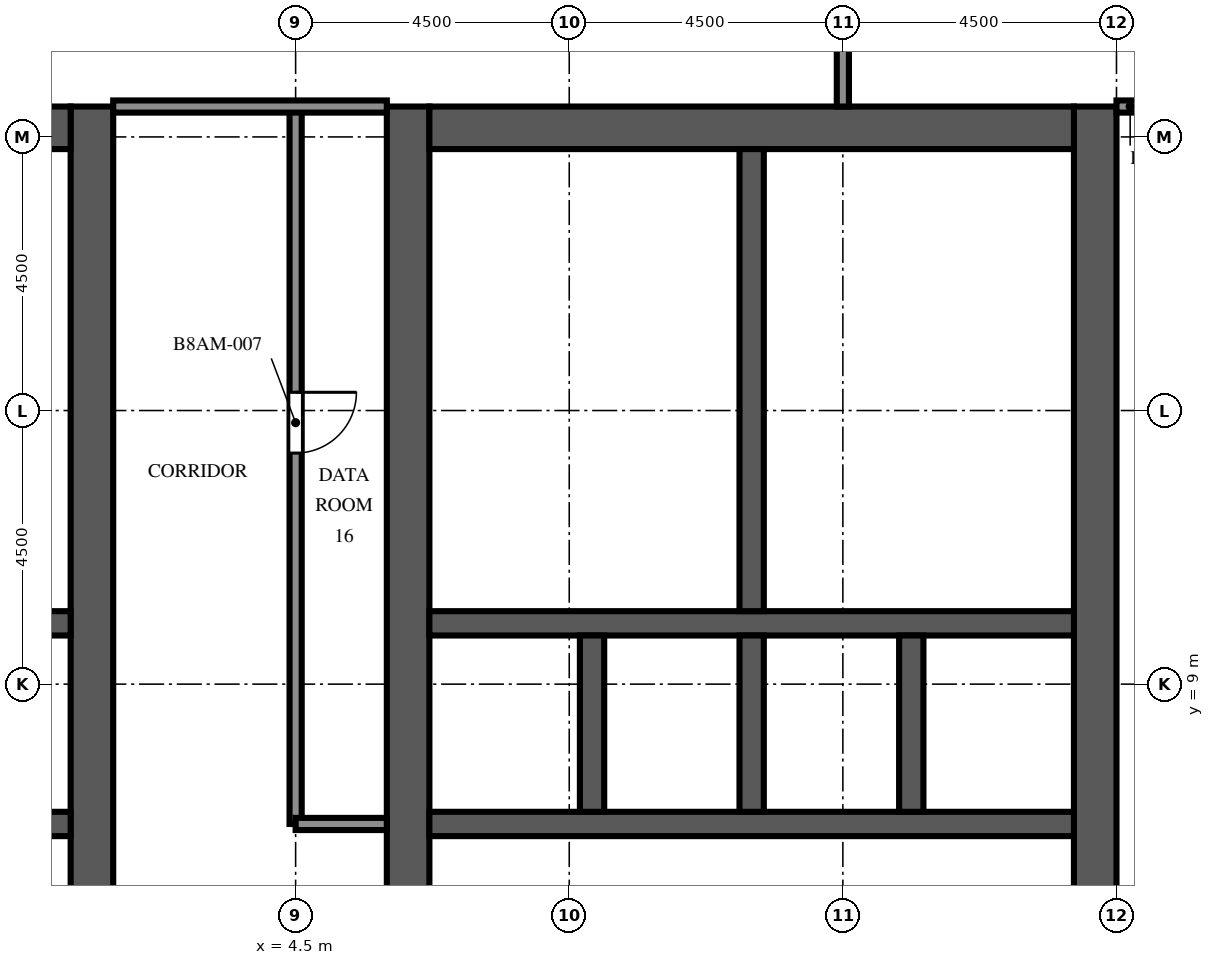
"""IFC4 building model, lengths in metres.
Left out: names, types, materials, properties, quantities, classifications, styles, units other than length and angle.
Written with IfcOpenShell. Run it as: python <this file> out.ifc"""

import sys

from ifc_helpers import new_model, si_unit, direction, frame, frame_2d, origin, place, context, subcontext, project, spatial, rectangle, extrude, element, fill, save


model = new_model("IFC4")
c1 = context("Model", 3, precision=1e-05, world=origin(), true_north=direction((0.0, 1.0)))
c2 = subcontext(c1, "Body", "Model", "MODEL_VIEW")
j1 = project(units=[si_unit("LENGTHUNIT", "METRE"), si_unit("PLANEANGLEUNIT", "RADIAN")], contexts=[c1])
p1 = place(None, origin())
s1 = spatial("IfcSite", under=j1, at=p1, CompositionType="ELEMENT")
p2 = place(p1, origin())
s2 = spatial("IfcBuilding", under=s1, at=p2, CompositionType="ELEMENT")
p3 = place(p2, frame((0.0, 0.0, 295.0)))
s3 = spatial("IfcBuildingStorey", under=s2, at=p3, CompositionType="ELEMENT", Elevation=295.0)
p4 = place(p3, frame((1.15, -9.0, 0.0), z_axis=(0.0, 0.0, 1.0), x_axis=(0.0, 1.0, 0.0)))
e1 = element("IfcWall", 1, at=p4, inside=s3, PredefinedType="SHEAR", context=c2, shape_type="SweptSolid", body=[
    extrude(rectangle(XDim=27.5, YDim=0.7, at=frame_2d((13.75, 0.0))), origin(), (0.0, 0.0, 1.0), 6.0),
])
p5 = place(p4, frame((12.55, 0.0, 0.0)))
e2 = element("IfcOpeningElement", 2, at=p5, cuts=e1, PredefinedType="OPENING", context=c2, shape_type="SweptSolid", body=[
    extrude(rectangle(XDim=2.4, YDim=2.4, at=frame_2d((1.2, 1.2))), frame((0.0, 0.36, 0.0), z_axis=(0.0, -1.0, 0.0), x_axis=(1.0, 0.0, 0.0)), (0.0, 0.0, 1.0), 0.72),
])
p6 = place(p4, frame((5.46, 0.0, 0.0)))
e3 = element("IfcOpeningElement", 3, at=p6, cuts=e1, PredefinedType="OPENING", context=c2, shape_type="SweptSolid", body=[
    extrude(rectangle(XDim=0.968, YDim=2.1, at=frame_2d((0.484, 1.05))), frame((0.0, 0.36, 0.0), z_axis=(0.0, -1.0, 0.0), x_axis=(1.0, 0.0, 0.0)), (0.0, 0.0, 1.0), 0.72),
])
p7 = place(p4, frame((23.54, 0.0, 0.0)))
e4 = element("IfcOpeningElement", 4, at=p7, cuts=e1, PredefinedType="OPENING", context=c2, shape_type="SweptSolid", body=[
    extrude(rectangle(XDim=1.2, YDim=2.1, at=frame_2d((0.6, 1.05))), frame((0.0, 0.36, 0.0), z_axis=(0.0, -1.0, 0.0), x_axis=(1.0, 0.0, 0.0)), (0.0, 0.0, 1.0), 0.72),
])
p8 = place(p3, frame((-9.8, 18.15, 0.0), z_axis=(0.0, 0.0, 1.0), x_axis=(1.0, 0.0, 0.0)))
e5 = element("IfcWall", 5, at=p8, inside=s3, PredefinedType="SHEAR", context=c2, shape_type="SweptSolid", body=[
    extrude(rectangle(XDim=10.6, YDim=0.7, at=frame_2d((5.3, 0.0))), origin(), (0.0, 0.0, 1.0), 6.0),
])
p9 = place(p3, frame((-9.8, 6.7, 0.0), z_axis=(0.0, 0.0, 1.0), x_axis=(1.0, 0.0, 0.0)))
e6 = element("IfcWall", 6, at=p9, inside=s3, PredefinedType="SHEAR", context=c2, shape_type="SweptSolid", body=[
    extrude(rectangle(XDim=10.6, YDim=0.4, at=frame_2d((5.3, 0.0))), origin(), (0.0, 0.0, 1.0), 6.0),
])
p10 = place(p9, frame((3.438, 0.0, 0.0)))
e7 = element("IfcOpeningElement", 7, at=p10, cuts=e6, PredefinedType="OPENING", context=c2, shape_type="SweptSolid", body=[
    extrude(rectangle(XDim=1.1, YDim=2.1, at=frame_2d((0.55, 1.05))), frame((0.0, 0.21, 0.0), z_axis=(0.0, -1.0, 0.0), x_axis=(1.0, 0.0, 0.0)), (0.0, 0.0, 1.0), 0.42),
])
p11 = place(p9, frame((6.062, 0.0, 0.0)))
e8 = element("IfcOpeningElement", 8, at=p11, cuts=e6, PredefinedType="OPENING", context=c2, shape_type="SweptSolid", body=[
    extrude(rectangle(XDim=1.1, YDim=2.1, at=frame_2d((0.55, 1.05))), frame((0.0, 0.21, 0.0), z_axis=(0.0, -1.0, 0.0), x_axis=(1.0, 0.0, 0.0)), (0.0, 0.0, 1.0), 0.42),
])
p12 = place(p9, frame((8.812, 0.0, 0.0)))
e9 = element("IfcOpeningElement", 9, at=p12, cuts=e6, PredefinedType="OPENING", context=c2, shape_type="SweptSolid", body=[
    extrude(rectangle(XDim=1.1, YDim=2.1, at=frame_2d((0.55, 1.05))), frame((0.0, 0.21, 0.0), z_axis=(0.0, -1.0, 0.0), x_axis=(1.0, 0.0, 0.0)), (0.0, 0.0, 1.0), 0.42),
])
p13 = place(p9, frame((0.738, 0.0, 0.0)))
e10 = element("IfcOpeningElement", 10, at=p13, cuts=e6, PredefinedType="OPENING", context=c2, shape_type="SweptSolid", body=[
    extrude(rectangle(XDim=1.0, YDim=2.1, at=frame_2d((0.5, 1.05))), frame((0.0, 0.21, 0.0), z_axis=(0.0, -1.0, 0.0), x_axis=(1.0, 0.0, 0.0)), (0.0, 0.0, 1.0), 0.42),
])
p14 = place(p3, frame((-9.8, 10.0, 0.0), z_axis=(0.0, 0.0, 1.0), x_axis=(1.0, 0.0, 0.0)))
e11 = element("IfcWall", 11, at=p14, inside=s3, PredefinedType="SHEAR", context=c2, shape_type="SweptSolid", body=[
    extrude(rectangle(XDim=10.6, YDim=0.4, at=frame_2d((5.3, 0.0))), origin(), (0.0, 0.0, 1.0), 6.0),
])
p15 = place(p3, frame((6.35, -9.0, 0.0), z_axis=(0.0, 0.0, 1.0), x_axis=(0.0, 1.0, 0.0)))
e12 = element("IfcWall", 12, at=p15, inside=s3, PredefinedType="SHEAR", context=c2, shape_type="SweptSolid", body=[
    extrude(rectangle(XDim=27.5, YDim=0.7, at=frame_2d((13.75, 0.0))), origin(), (0.0, 0.0, 1.0), 6.0),
])
p16 = place(p15, frame((12.55, 0.0, 0.0)))
e13 = element("IfcOpeningElement", 13, at=p16, cuts=e12, PredefinedType="OPENING", context=c2, shape_type="SweptSolid", body=[
    extrude(rectangle(XDim=2.4, YDim=2.4, at=frame_2d((1.2, 1.2))), frame((0.0, 0.36, 0.0), z_axis=(0.0, -1.0, 0.0), x_axis=(1.0, 0.0, 0.0)), (0.0, 0.0, 1.0), 0.72),
])
p17 = place(p15, frame((5.46, 0.0, 0.0)))
e14 = element("IfcOpeningElement", 14, at=p17, cuts=e12, PredefinedType="OPENING", context=c2, shape_type="SweptSolid", body=[
    extrude(rectangle(XDim=0.968, YDim=2.1, at=frame_2d((0.484, 1.05))), frame((0.0, 0.36, 0.0), z_axis=(0.0, -1.0, 0.0), x_axis=(1.0, 0.0, 0.0)), (0.0, 0.0, 1.0), 0.72),
])
p18 = place(p15, frame((23.54, 0.0, 0.0)))
e15 = element("IfcOpeningElement", 15, at=p18, cuts=e12, PredefinedType="OPENING", context=c2, shape_type="SweptSolid", body=[
    extrude(rectangle(XDim=1.2, YDim=2.1, at=frame_2d((0.6, 1.05))), frame((0.0, 0.36, 0.0), z_axis=(0.0, -1.0, 0.0), x_axis=(1.0, 0.0, 0.0)), (0.0, 0.0, 1.0), 0.72),
])
p19 = place(p3, frame((17.65, -9.0, 0.0), z_axis=(0.0, 0.0, 1.0), x_axis=(0.0, 1.0, 0.0)))
e16 = element("IfcWall", 16, at=p19, inside=s3, PredefinedType="SHEAR", context=c2, shape_type="SweptSolid", body=[
    extrude(rectangle(XDim=27.5, YDim=0.7, at=frame_2d((13.75, 0.0))), origin(), (0.0, 0.0, 1.0), 6.0),
])
p20 = place(p19, frame((12.55, 0.0, 0.0)))
e17 = element("IfcOpeningElement", 17, at=p20, cuts=e16, PredefinedType="OPENING", context=c2, shape_type="SweptSolid", body=[
    extrude(rectangle(XDim=2.4, YDim=2.4, at=frame_2d((1.2, 1.2))), frame((0.0, 0.36, 0.0), z_axis=(0.0, -1.0, 0.0), x_axis=(1.0, 0.0, 0.0)), (0.0, 0.0, 1.0), 0.72),
])
p21 = place(p19, frame((6.825, 0.0, 0.0)))
e18 = element("IfcOpeningElement", 18, at=p21, cuts=e16, PredefinedType="OPENING", context=c2, shape_type="SweptSolid", body=[
    extrude(rectangle(XDim=1.2, YDim=2.1, at=frame_2d((0.6, 1.05))), frame((0.0, 0.36, 0.0), z_axis=(0.0, -1.0, 0.0), x_axis=(1.0, 0.0, 0.0)), (0.0, 0.0, 1.0), 0.72),
])
p22 = place(p19, frame((19.475, 0.0, 0.0)))
e19 = element("IfcOpeningElement", 19, at=p22, cuts=e16, PredefinedType="OPENING", context=c2, shape_type="SweptSolid", body=[
    extrude(rectangle(XDim=1.2, YDim=2.1, at=frame_2d((0.6, 1.05))), frame((0.0, 0.36, 0.0), z_axis=(0.0, -1.0, 0.0), x_axis=(1.0, 0.0, 0.0)), (0.0, 0.0, 1.0), 0.72),
])
p23 = place(p3, frame((6.7, 18.15, 0.0), z_axis=(0.0, 0.0, 1.0), x_axis=(1.0, 0.0, 0.0)))
e20 = element("IfcWall", 20, at=p23, inside=s3, PredefinedType="SHEAR", context=c2, shape_type="SweptSolid", body=[
    extrude(rectangle(XDim=10.6, YDim=0.7, at=frame_2d((5.3, 0.0))), origin(), (0.0, 0.0, 1.0), 6.0),
])
p24 = place(p3, frame((6.7, 6.7, 0.0), z_axis=(0.0, 0.0, 1.0), x_axis=(1.0, 0.0, 0.0)))
e21 = element("IfcWall", 21, at=p24, inside=s3, PredefinedType="SHEAR", context=c2, shape_type="SweptSolid", body=[
    extrude(rectangle(XDim=10.6, YDim=0.4, at=frame_2d((5.3, 0.0))), origin(), (0.0, 0.0, 1.0), 6.0),
])
p25 = place(p24, frame((3.438, 0.0, 0.0)))
e22 = element("IfcOpeningElement", 22, at=p25, cuts=e21, PredefinedType="OPENING", context=c2, shape_type="SweptSolid", body=[
    extrude(rectangle(XDim=1.1, YDim=2.1, at=frame_2d((0.55, 1.05))), frame((0.0, 0.21, 0.0), z_axis=(0.0, -1.0, 0.0), x_axis=(1.0, 0.0, 0.0)), (0.0, 0.0, 1.0), 0.42),
])
p26 = place(p24, frame((6.062, 0.0, 0.0)))
e23 = element("IfcOpeningElement", 23, at=p26, cuts=e21, PredefinedType="OPENING", context=c2, shape_type="SweptSolid", body=[
    extrude(rectangle(XDim=1.1, YDim=2.1, at=frame_2d((0.55, 1.05))), frame((0.0, 0.21, 0.0), z_axis=(0.0, -1.0, 0.0), x_axis=(1.0, 0.0, 0.0)), (0.0, 0.0, 1.0), 0.42),
])
p27 = place(p24, frame((8.812, 0.0, 0.0)))
e24 = element("IfcOpeningElement", 24, at=p27, cuts=e21, PredefinedType="OPENING", context=c2, shape_type="SweptSolid", body=[
    extrude(rectangle(XDim=1.1, YDim=2.1, at=frame_2d((0.55, 1.05))), frame((0.0, 0.21, 0.0), z_axis=(0.0, -1.0, 0.0), x_axis=(1.0, 0.0, 0.0)), (0.0, 0.0, 1.0), 0.42),
])
p28 = place(p24, frame((0.738, 0.0, 0.0)))
e25 = element("IfcOpeningElement", 25, at=p28, cuts=e21, PredefinedType="OPENING", context=c2, shape_type="SweptSolid", body=[
    extrude(rectangle(XDim=1.0, YDim=2.1, at=frame_2d((0.5, 1.05))), frame((0.0, 0.21, 0.0), z_axis=(0.0, -1.0, 0.0), x_axis=(1.0, 0.0, 0.0)), (0.0, 0.0, 1.0), 0.42),
])
p29 = place(p3, frame((6.7, 10.0, 0.0), z_axis=(0.0, 0.0, 1.0), x_axis=(1.0, 0.0, 0.0)))
e26 = element("IfcWall", 26, at=p29, inside=s3, PredefinedType="SHEAR", context=c2, shape_type="SweptSolid", body=[
    extrude(rectangle(XDim=10.6, YDim=0.4, at=frame_2d((5.3, 0.0))), origin(), (0.0, 0.0, 1.0), 6.0),
])
for number, where, z_axis, x_axis in (
    (27, (9.375, 6.9, 0.0), (0.0, 0.0, 1.0), (0.0, 1.0, 0.0)),
    (28, (12.0, 6.9, 0.0), (0.0, 0.0, 1.0), (0.0, 1.0, 0.0)),
    (29, (14.625, 6.9, 0.0), (0.0, 0.0, 1.0), (0.0, 1.0, 0.0)),
):
    element("IfcWall", number, at=place(p3, frame(where, z_axis=z_axis, x_axis=x_axis)), inside=s3, PredefinedType="SHEAR", context=c2, shape_type="SweptSolid", body=[
        extrude(rectangle(XDim=2.9, YDim=0.4, at=frame_2d((1.45, 0.0))), origin(), (0.0, 0.0, 1.0), 6.0),
    ])
p30 = place(p3, frame((12.0, 10.2, 0.0), z_axis=(0.0, 0.0, 1.0), x_axis=(0.0, 1.0, 0.0)))
e30 = element("IfcWall", 30, at=p30, inside=s3, PredefinedType="SHEAR", context=c2, shape_type="SweptSolid", body=[
    extrude(rectangle(XDim=7.6, YDim=0.4, at=frame_2d((3.8, 0.0))), origin(), (0.0, 0.0, 1.0), 6.0),
])
p31 = place(p3, frame((-0.5, 12.48, 0.0), z_axis=(0.0, 0.0, 1.0), x_axis=(1.0, 0.0, 0.0)))
e31 = element("IfcWall", 31, at=p31, inside=s3, PredefinedType="PARTITIONING", context=c2, shape_type="SweptSolid", body=[
    extrude(rectangle(XDim=1.3, YDim=0.1, at=frame_2d((0.65, 0.0))), origin(), (0.0, 0.0, 1.0), 5.4),
])
p32 = place(p31, frame((0.2, 0.0, 0.0)))
e32 = element("IfcOpeningElement", 32, at=p32, cuts=e31, PredefinedType="OPENING", context=c2, shape_type="SweptSolid", body=[
    extrude(rectangle(XDim=0.9, YDim=2.1, at=frame_2d((0.45, 1.05))), frame((0.0, 0.06, 0.0), z_axis=(0.0, -1.0, 0.0), x_axis=(1.0, 0.0, 0.0)), (0.0, 0.0, 1.0), 0.12),
])
p33 = place(p3, frame((6.7, 12.48, 0.0), z_axis=(0.0, 0.0, 1.0), x_axis=(1.0, 0.0, 0.0)))
e33 = element("IfcWall", 33, at=p33, inside=s3, PredefinedType="PARTITIONING", context=c2, shape_type="SweptSolid", body=[
    extrude(rectangle(XDim=1.3, YDim=0.1, at=frame_2d((0.65, 0.0))), origin(), (0.0, 0.0, 1.0), 5.4),
])
p34 = place(p33, frame((0.2, 0.0, 0.0)))
e34 = element("IfcOpeningElement", 34, at=p34, cuts=e33, PredefinedType="OPENING", context=c2, shape_type="SweptSolid", body=[
    extrude(rectangle(XDim=0.9, YDim=2.1, at=frame_2d((0.45, 1.05))), frame((0.0, 0.06, 0.0), z_axis=(0.0, -1.0, 0.0), x_axis=(1.0, 0.0, 0.0)), (0.0, 0.0, 1.0), 0.12),
])
p35 = place(p3, frame((8.0, 12.48, 0.0), z_axis=(0.0, 0.0, 1.0), x_axis=(1.0, 0.0, 0.0)))
e35 = element("IfcWall", 35, at=p35, inside=s3, PredefinedType="PARTITIONING", context=c2, shape_type="SweptSolid", body=[
    extrude(rectangle(XDim=3.8, YDim=0.1, at=frame_2d((1.9, 0.0))), origin(), (0.0, 0.0, 1.0), 5.4),
])
p36 = place(p3, frame((8.0, 12.48, 0.0), z_axis=(0.0, 0.0, 1.0), x_axis=(0.0, 1.0, 0.0)))
e36 = element("IfcWall", 36, at=p36, inside=s3, PredefinedType="PARTITIONING", context=c2, shape_type="SweptSolid", body=[
    extrude(rectangle(XDim=2.66, YDim=0.1, at=frame_2d((1.33, 0.0))), origin(), (0.0, 0.0, 1.0), 5.4),
])
p37 = place(p36, frame((0.83, 0.0, 0.0)))
e37 = element("IfcOpeningElement", 37, at=p37, cuts=e36, PredefinedType="OPENING", context=c2, shape_type="SweptSolid", body=[
    extrude(rectangle(XDim=1.0, YDim=2.1, at=frame_2d((0.5, 1.05))), frame((0.0, 0.06, 0.0), z_axis=(0.0, -1.0, 0.0), x_axis=(1.0, 0.0, 0.0)), (0.0, 0.0, 1.0), 0.12),
])
p38 = place(p3, frame((8.0, 15.14, 0.0), z_axis=(0.0, 0.0, 1.0), x_axis=(0.0, 1.0, 0.0)))
e38 = element("IfcWall", 38, at=p38, inside=s3, PredefinedType="PARTITIONING", context=c2, shape_type="SweptSolid", body=[
    extrude(rectangle(XDim=2.66, YDim=0.1, at=frame_2d((1.33, 0.0))), origin(), (0.0, 0.0, 1.0), 5.4),
])
p39 = place(p38, frame((0.83, 0.0, 0.0)))
e39 = element("IfcOpeningElement", 39, at=p39, cuts=e38, PredefinedType="OPENING", context=c2, shape_type="SweptSolid", body=[
    extrude(rectangle(XDim=1.0, YDim=2.1, at=frame_2d((0.5, 1.05))), frame((0.0, 0.06, 0.0), z_axis=(0.0, -1.0, 0.0), x_axis=(1.0, 0.0, 0.0)), (0.0, 0.0, 1.0), 0.12),
])
p40 = place(p3, frame((8.0, 15.14, 0.0), z_axis=(0.0, 0.0, 1.0), x_axis=(1.0, 0.0, 0.0)))
e40 = element("IfcWall", 40, at=p40, inside=s3, PredefinedType="PARTITIONING", context=c2, shape_type="SweptSolid", body=[
    extrude(rectangle(XDim=3.8, YDim=0.1, at=frame_2d((1.9, 0.0))), origin(), (0.0, 0.0, 1.0), 5.4),
])
p41 = place(p3, frame((4.5, 18.5, 0.0), z_axis=(0.0, 0.0, 1.0), x_axis=(0.0, -1.0, 0.0)))
e41 = element("IfcWall", 41, at=p41, inside=s3, PredefinedType="PARTITIONING", context=c2, shape_type="SweptSolid", body=[
    extrude(rectangle(XDim=11.8, YDim=0.2, at=frame_2d((5.9, 0.0))), origin(), (0.0, 0.0, 1.0), 5.4),
])
p42 = place(p41, frame((4.7, 0.0, 0.0)))
e42 = element("IfcOpeningElement", 42, at=p42, cuts=e41, PredefinedType="OPENING", context=c2, shape_type="SweptSolid", body=[
    extrude(rectangle(XDim=1.0, YDim=2.1, at=frame_2d((0.5, 1.05))), frame((0.0, 0.11, 0.0), z_axis=(0.0, -1.0, 0.0), x_axis=(1.0, 0.0, 0.0)), (0.0, 0.0, 1.0), 0.22),
])
p43 = place(p3, frame((13.5, 18.5, 0.0), z_axis=(0.0, 0.0, 1.0), x_axis=(0.0, 1.0, 0.0)))
e43 = element("IfcWall", 43, at=p43, inside=s3, PredefinedType="PARTITIONING", context=c2, shape_type="SweptSolid", body=[
    extrude(rectangle(XDim=3.55, YDim=0.2, at=frame_2d((1.775, 0.0))), origin(), (0.0, 0.0, 1.0), 5.4),
])
p44 = place(p3, frame((4.5, 6.7, 0.0), z_axis=(0.0, 0.0, 1.0), x_axis=(1.0, 0.0, 0.0)))
e44 = element("IfcWall", 44, at=p44, inside=s3, PredefinedType="PARTITIONING", context=c2, shape_type="SweptSolid", body=[
    extrude(rectangle(XDim=1.5, YDim=0.2, at=frame_2d((0.75, 0.0))), origin(), (0.0, 0.0, 1.0), 5.4),
])
p45 = place(p3, frame((1.5, 18.5, 0.0), z_axis=(0.0, 0.0, 1.0), x_axis=(1.0, 0.0, 0.0)))
e45 = element("IfcWall", 45, at=p45, inside=s3, PredefinedType="PARTITIONING", context=c2, shape_type="SweptSolid", body=[
    extrude(rectangle(XDim=4.5, YDim=0.2, at=frame_2d((2.25, 0.0))), origin(), (0.0, 0.0, 1.0), 5.4),
])
p46 = place(p3, frame((18.0, 18.5, 0.0), z_axis=(0.0, 0.0, 1.0), x_axis=(1.0, 0.0, 0.0)))
e46 = element("IfcWall", 46, at=p46, inside=s3, PredefinedType="PARTITIONING", context=c2, shape_type="SweptSolid", body=[
    extrude(rectangle(XDim=0.45, YDim=0.2, at=frame_2d((0.225, 0.0))), origin(), (0.0, 0.0, 1.0), 3.57),
])
p47 = place(p25, origin())
e47 = element("IfcDoor", 47, at=p47, inside=s3, OperationType="DOUBLE_DOOR_SLIDING", PredefinedType="DOOR", context=c2, shape_type="SweptSolid", body=[
    extrude(rectangle(XDim=1.1, YDim=2.1, at=frame_2d((0.55, 1.05))), frame((0.0, 0.025, 0.0), z_axis=(0.0, -1.0, 0.0), x_axis=(1.0, 0.0, 0.0)), (0.0, 0.0, 1.0), 0.05),
])
fill(e22, e47)
p48 = place(p26, origin())
e48 = element("IfcDoor", 48, at=p48, inside=s3, OperationType="DOUBLE_DOOR_SLIDING", PredefinedType="DOOR", context=c2, shape_type="SweptSolid", body=[
    extrude(rectangle(XDim=1.1, YDim=2.1, at=frame_2d((0.55, 1.05))), frame((0.0, 0.025, 0.0), z_axis=(0.0, -1.0, 0.0), x_axis=(1.0, 0.0, 0.0)), (0.0, 0.0, 1.0), 0.05),
])
fill(e23, e48)
p49 = place(p27, origin())
e49 = element("IfcDoor", 49, at=p49, inside=s3, OperationType="DOUBLE_DOOR_SLIDING", PredefinedType="DOOR", context=c2, shape_type="SweptSolid", body=[
    extrude(rectangle(XDim=1.1, YDim=2.1, at=frame_2d((0.55, 1.05))), frame((0.0, 0.025, 0.0), z_axis=(0.0, -1.0, 0.0), x_axis=(1.0, 0.0, 0.0)), (0.0, 0.0, 1.0), 0.05),
])
fill(e24, e49)
p50 = place(p5, origin())
e50 = element("IfcDoor", 50, at=p50, inside=s3, OperationType="DOUBLE_DOOR_DOUBLE_SWING", PredefinedType="DOOR", context=c2, shape_type="SweptSolid", body=[
    extrude(rectangle(XDim=2.4, YDim=2.4, at=frame_2d((1.2, 1.2))), frame((0.0, 0.025, 0.0), z_axis=(0.0, -1.0, 0.0), x_axis=(1.0, 0.0, 0.0)), (0.0, 0.0, 1.0), 0.05),
])
fill(e2, e50)
p51 = place(p16, origin())
e51 = element("IfcDoor", 51, at=p51, inside=s3, OperationType="DOUBLE_DOOR_DOUBLE_SWING", PredefinedType="DOOR", context=c2, shape_type="SweptSolid", body=[
    extrude(rectangle(XDim=2.4, YDim=2.4, at=frame_2d((1.2, 1.2))), frame((0.0, 0.025, 0.0), z_axis=(0.0, -1.0, 0.0), x_axis=(1.0, 0.0, 0.0)), (0.0, 0.0, 1.0), 0.05),
])
fill(e13, e51)
p52 = place(p20, origin())
e52 = element("IfcDoor", 52, at=p52, inside=s3, OperationType="DOUBLE_DOOR_DOUBLE_SWING", PredefinedType="DOOR", context=c2, shape_type="SweptSolid", body=[
    extrude(rectangle(XDim=2.4, YDim=2.4, at=frame_2d((1.2, 1.2))), frame((0.0, 0.025, 0.0), z_axis=(0.0, -1.0, 0.0), x_axis=(1.0, 0.0, 0.0)), (0.0, 0.0, 1.0), 0.05),
])
fill(e17, e52)
p53 = place(p22, frame((1.2, 0.0, 0.0), z_axis=(0.0, 0.0, 1.0), x_axis=(-1.0, 0.0, 0.0)))
e53 = element("IfcDoor", 53, at=p53, inside=s3, OperationType="SINGLE_SWING_LEFT", PredefinedType="DOOR", context=c2, shape_type="SweptSolid", body=[
    extrude(rectangle(XDim=1.2, YDim=2.1, at=frame_2d((0.6, 1.05))), frame((0.0, 0.025, 0.0), z_axis=(0.0, -1.0, 0.0), x_axis=(1.0, 0.0, 0.0)), (0.0, 0.0, 1.0), 0.05),
])
fill(e19, e53)
p54 = place(p32, origin())
e54 = element("IfcDoor", 54, at=p54, inside=s3, OperationType="SINGLE_SWING_LEFT", PredefinedType="DOOR", context=c2, shape_type="SweptSolid", body=[
    extrude(rectangle(XDim=0.9, YDim=2.1, at=frame_2d((0.45, 1.05))), frame((0.0, 0.025, 0.0), z_axis=(0.0, -1.0, 0.0), x_axis=(1.0, 0.0, 0.0)), (0.0, 0.0, 1.0), 0.05),
])
fill(e32, e54)
p55 = place(p7, origin())
e55 = element("IfcDoor", 55, at=p55, inside=s3, OperationType="SINGLE_SWING_RIGHT", PredefinedType="DOOR", context=c2, shape_type="SweptSolid", body=[
    extrude(rectangle(XDim=1.2, YDim=2.1, at=frame_2d((0.6, 1.05))), frame((0.0, 0.325, 0.0), z_axis=(0.0, -1.0, 0.0), x_axis=(1.0, 0.0, 0.0)), (0.0, 0.0, 1.0), 0.05),
])
fill(e4, e55)
p56 = place(p28, origin())
e56 = element("IfcDoor", 56, at=p56, inside=s3, OperationType="SINGLE_SWING_LEFT", PredefinedType="DOOR", context=c2, shape_type="SweptSolid", body=[
    extrude(rectangle(XDim=1.0, YDim=2.1, at=frame_2d((0.5, 1.05))), frame((0.0, 0.025, 0.0), z_axis=(0.0, -1.0, 0.0), x_axis=(1.0, 0.0, 0.0)), (0.0, 0.0, 1.0), 0.05),
])
fill(e25, e56)
p57 = place(p34, origin())
e57 = element("IfcDoor", 57, at=p57, inside=s3, OperationType="SINGLE_SWING_RIGHT", PredefinedType="DOOR", context=c2, shape_type="SweptSolid", body=[
    extrude(rectangle(XDim=0.9, YDim=2.1, at=frame_2d((0.45, 1.05))), frame((0.0, 0.025, 0.0), z_axis=(0.0, -1.0, 0.0), x_axis=(1.0, 0.0, 0.0)), (0.0, 0.0, 1.0), 0.05),
])
fill(e34, e57)
p58 = place(p18, origin())
e58 = element("IfcDoor", 58, at=p58, inside=s3, OperationType="SINGLE_SWING_LEFT", PredefinedType="DOOR", context=c2, shape_type="SweptSolid", body=[
    extrude(rectangle(XDim=1.2, YDim=2.1, at=frame_2d((0.6, 1.05))), frame((0.0, -0.275, 0.0), z_axis=(0.0, -1.0, 0.0), x_axis=(1.0, 0.0, 0.0)), (0.0, 0.0, 1.0), 0.05),
])
fill(e15, e58)
p59 = place(p37, origin())
e59 = element("IfcDoor", 59, at=p59, inside=s3, OperationType="SINGLE_SWING_RIGHT", PredefinedType="DOOR", context=c2, shape_type="SweptSolid", body=[
    extrude(rectangle(XDim=1.0, YDim=2.1, at=frame_2d((0.5, 1.05))), frame((0.0, 0.025, 0.0), z_axis=(0.0, -1.0, 0.0), x_axis=(1.0, 0.0, 0.0)), (0.0, 0.0, 1.0), 0.05),
])
fill(e37, e59)
p60 = place(p39, origin())
e60 = element("IfcDoor", 60, at=p60, inside=s3, OperationType="SINGLE_SWING_LEFT", PredefinedType="DOOR", context=c2, shape_type="SweptSolid", body=[
    extrude(rectangle(XDim=1.0, YDim=2.1, at=frame_2d((0.5, 1.05))), frame((0.0, 0.025, 0.0), z_axis=(0.0, -1.0, 0.0), x_axis=(1.0, 0.0, 0.0)), (0.0, 0.0, 1.0), 0.05),
])
fill(e39, e60)
p61 = place(p42, origin())
e61 = element("IfcDoor", 61, at=p61, inside=s3, OperationType="SINGLE_SWING_LEFT", PredefinedType="DOOR", context=c2, shape_type="SweptSolid", body=[
    extrude(rectangle(XDim=1.0, YDim=2.1, at=frame_2d((0.5, 1.05))), frame((0.0, 0.025, 0.0), z_axis=(0.0, -1.0, 0.0), x_axis=(1.0, 0.0, 0.0)), (0.0, 0.0, 1.0), 0.05),
])
fill(e42, e61)
save(model, sys.argv[1])
